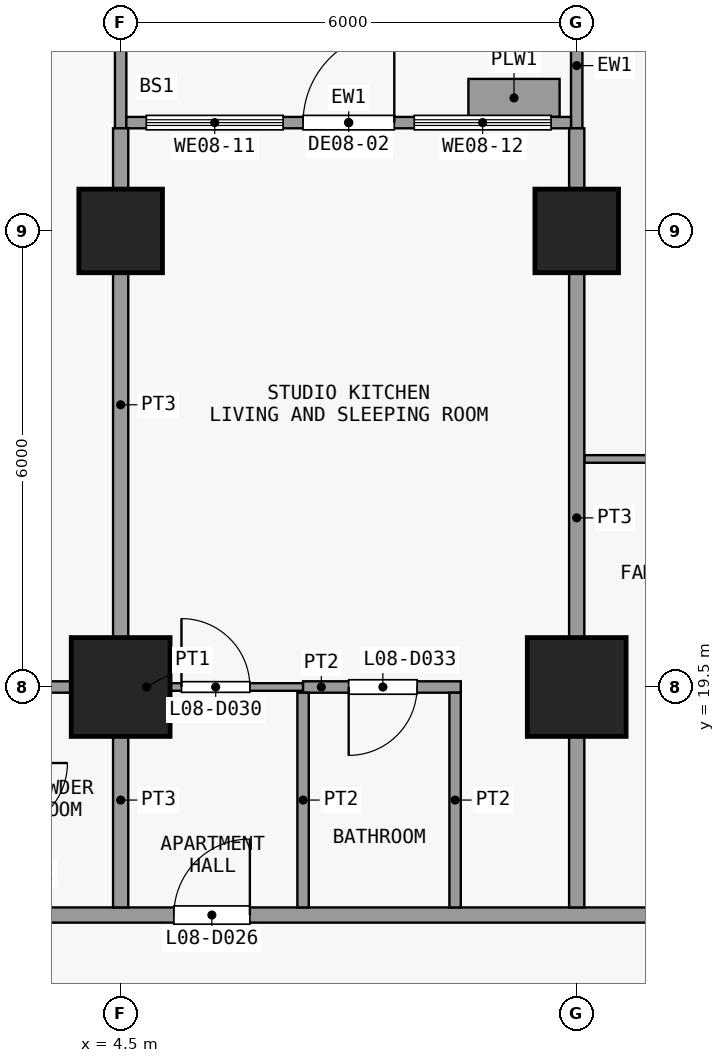
"""IFC4 building model, lengths in metres.
Left out: names, types, materials, properties, quantities, classifications, styles, units other than length and angle.
Written with IfcOpenShell. Run it as: python <this file> out.ifc"""

import sys

from ifc_helpers import new_model, si_unit, direction, frame, frame_2d, origin, origin_2d, place, context, subcontext, project, spatial, rectangle, extrude, element, fill, save


model = new_model("IFC4")
c1 = context("Model", 3, precision=1e-05, world=origin(), true_north=direction((0.0, 1.0)))
c2 = subcontext(c1, "Body", "Model", "MODEL_VIEW")
j1 = project(units=[si_unit("LENGTHUNIT", "METRE"), si_unit("PLANEANGLEUNIT", "RADIAN")], contexts=[c1])
p1 = place(None, origin())
s1 = spatial("IfcSite", under=j1, at=p1, CompositionType="ELEMENT")
p2 = place(p1, origin())
s2 = spatial("IfcBuilding", under=s1, at=p2, CompositionType="ELEMENT")
p3 = place(p2, frame((0.0, 0.0, 39.7)))
s3 = spatial("IfcBuildingStorey", under=s2, at=p3, CompositionType="ELEMENT", Elevation=39.7)
p4 = place(p3, frame((4.5, 19.5, 0.0), z_axis=(0.0, 0.0, 1.0), x_axis=(1.0, 0.0, 0.0)))
e1 = element("IfcColumn", 1, at=p4, inside=s3, PredefinedType="COLUMN", context=c2, shape_type="SweptSolid", body=[
    extrude(rectangle(XDim=1.3, YDim=1.3, at=origin_2d()), origin(), (0.0, 0.0, 1.0), 3.6),
])
p5 = place(p3, frame((4.5, 25.5, 0.0), z_axis=(0.0, 0.0, 1.0), x_axis=(1.0, 0.0, 0.0)))
e2 = element("IfcColumn", 2, at=p5, inside=s3, PredefinedType="COLUMN", context=c2, shape_type="SweptSolid", body=[
    extrude(rectangle(XDim=1.1, YDim=1.1, at=origin_2d()), origin(), (0.0, 0.0, 1.0), 3.6),
])
p6 = place(p3, frame((10.5, 19.5, 0.0), z_axis=(0.0, 0.0, 1.0), x_axis=(1.0, 0.0, 0.0)))
e3 = element("IfcColumn", 3, at=p6, inside=s3, PredefinedType="COLUMN", context=c2, shape_type="SweptSolid", body=[
    extrude(rectangle(XDim=1.3, YDim=1.3, at=origin_2d()), origin(), (0.0, 0.0, 1.0), 3.6),
])
p7 = place(p3, frame((10.5, 25.5, 0.0), z_axis=(0.0, 0.0, 1.0), x_axis=(1.0, 0.0, 0.0)))
e4 = element("IfcColumn", 4, at=p7, inside=s3, PredefinedType="COLUMN", context=c2, shape_type="SweptSolid", body=[
    extrude(rectangle(XDim=1.1, YDim=1.1, at=origin_2d()), origin(), (0.0, 0.0, 1.0), 3.6),
])
p8 = place(p3, frame((4.5, 26.85, 0.0), z_axis=(0.0, 0.0, 1.0), x_axis=(0.0, 1.0, 0.0)))
e5 = element("IfcWall", 5, at=p8, inside=s3, PredefinedType="SOLIDWALL", context=c2, shape_type="SweptSolid", body=[
    extrude(rectangle(XDim=2.55, YDim=0.15, at=frame_2d((1.275, 0.0))), origin(), (0.0, 0.0, 1.0), 3.3),
])
p9 = place(p3, frame((10.5, 26.85, 0.0), z_axis=(0.0, 0.0, 1.0), x_axis=(0.0, 1.0, 0.0)))
e6 = element("IfcWall", 6, at=p9, inside=s3, PredefinedType="SOLIDWALL", context=c2, shape_type="SweptSolid", body=[
    extrude(rectangle(XDim=1.65, YDim=0.15, at=frame_2d((0.825, 0.0))), origin(), (0.0, 0.0, 1.0), 3.3),
])
p10 = place(p3, frame((4.575, 26.925, 0.0), z_axis=(0.0, 0.0, 1.0), x_axis=(1.0, 0.0, 0.0)))
e7 = element("IfcWall", 7, at=p10, inside=s3, PredefinedType="SOLIDWALL", context=c2, shape_type="SweptSolid", body=[
    extrude(rectangle(XDim=5.85, YDim=0.15, at=frame_2d((2.925, 0.0))), origin(), (0.0, 0.0, 1.0), 3.3),
])
p11 = place(p10, frame((2.325, 0.0, 0.0)))
e8 = element("IfcOpeningElement", 8, at=p11, cuts=e7, PredefinedType="OPENING", context=c2, shape_type="SweptSolid", body=[
    extrude(rectangle(XDim=1.2, YDim=2.4, at=frame_2d((0.6, 1.2))), frame((0.0, 0.085, 0.0), z_axis=(0.0, -1.0, 0.0), x_axis=(1.0, 0.0, 0.0)), (0.0, 0.0, 1.0), 0.17),
])
p12 = place(p10, frame((0.262, 0.0, 0.9)))
e9 = element("IfcOpeningElement", 9, at=p12, cuts=e7, PredefinedType="OPENING", context=c2, shape_type="SweptSolid", body=[
    extrude(rectangle(XDim=1.8, YDim=2.1, at=frame_2d((0.9, 1.05))), frame((0.0, 0.085, 0.0), z_axis=(0.0, -1.0, 0.0), x_axis=(1.0, 0.0, 0.0)), (0.0, 0.0, 1.0), 0.17),
])
p13 = place(p10, frame((3.788, 0.0, 0.9)))
e10 = element("IfcOpeningElement", 10, at=p13, cuts=e7, PredefinedType="OPENING", context=c2, shape_type="SweptSolid", body=[
    extrude(rectangle(XDim=1.8, YDim=2.1, at=frame_2d((0.9, 1.05))), frame((0.0, 0.085, 0.0), z_axis=(0.0, -1.0, 0.0), x_axis=(1.0, 0.0, 0.0)), (0.0, 0.0, 1.0), 0.17),
])
p14 = place(p3, frame((9.075, 27.25, 0.0), z_axis=(0.0, 0.0, 1.0), x_axis=(1.0, 0.0, 0.0)))
e11 = element("IfcWall", 11, at=p14, inside=s3, PredefinedType="USERDEFINED", context=c2, shape_type="SweptSolid", body=[
    extrude(rectangle(XDim=1.2, YDim=0.5, at=frame_2d((0.6, 0.0))), origin(), (0.0, 0.0, 1.0), 0.9),
])
p15 = place(p3, frame((-25.35, 16.5, 0.0), z_axis=(0.0, 0.0, 1.0), x_axis=(1.0, 0.0, 0.0)))
e12 = element("IfcWall", 12, at=p15, inside=s3, PredefinedType="PARTITIONING", context=c2, shape_type="SweptSolid", body=[
    extrude(rectangle(XDim=50.7, YDim=0.2, at=frame_2d((25.35, 0.0))), origin(), (0.0, 0.0, 1.0), 3.3),
])
p16 = place(p15, frame((4.55, 0.0, 0.0)))
e13 = element("IfcOpeningElement", 13, at=p16, cuts=e12, PredefinedType="OPENING", context=c2, shape_type="SweptSolid", body=[
    extrude(rectangle(XDim=1.0, YDim=2.1, at=frame_2d((0.5, 1.05))), frame((0.0, 0.11, 0.0), z_axis=(0.0, -1.0, 0.0), x_axis=(1.0, 0.0, 0.0)), (0.0, 0.0, 1.0), 0.22),
])
p17 = place(p15, frame((11.35, 0.0, 0.0)))
e14 = element("IfcOpeningElement", 14, at=p17, cuts=e12, PredefinedType="OPENING", context=c2, shape_type="SweptSolid", body=[
    extrude(rectangle(XDim=0.9, YDim=2.1, at=frame_2d((0.45, 1.05))), frame((0.0, 0.11, 0.0), z_axis=(0.0, -1.0, 0.0), x_axis=(1.0, 0.0, 0.0)), (0.0, 0.0, 1.0), 0.22),
])
p18 = place(p15, frame((17.35, 0.0, 0.0)))
e15 = element("IfcOpeningElement", 15, at=p18, cuts=e12, PredefinedType="OPENING", context=c2, shape_type="SweptSolid", body=[
    extrude(rectangle(XDim=0.9, YDim=2.1, at=frame_2d((0.45, 1.05))), frame((0.0, 0.11, 0.0), z_axis=(0.0, -1.0, 0.0), x_axis=(1.0, 0.0, 0.0)), (0.0, 0.0, 1.0), 0.22),
])
p19 = place(p15, frame((24.05, 0.0, 0.0)))
e16 = element("IfcOpeningElement", 16, at=p19, cuts=e12, PredefinedType="OPENING", context=c2, shape_type="SweptSolid", body=[
    extrude(rectangle(XDim=1.0, YDim=2.1, at=frame_2d((0.5, 1.05))), frame((0.0, 0.11, 0.0), z_axis=(0.0, -1.0, 0.0), x_axis=(1.0, 0.0, 0.0)), (0.0, 0.0, 1.0), 0.22),
])
p20 = place(p15, frame((30.55, 0.0, 0.0)))
e17 = element("IfcOpeningElement", 17, at=p20, cuts=e12, PredefinedType="OPENING", context=c2, shape_type="SweptSolid", body=[
    extrude(rectangle(XDim=1.0, YDim=2.1, at=frame_2d((0.5, 1.05))), frame((0.0, 0.11, 0.0), z_axis=(0.0, -1.0, 0.0), x_axis=(1.0, 0.0, 0.0)), (0.0, 0.0, 1.0), 0.22),
])
p21 = place(p15, frame((42.55, 0.0, 0.0)))
e18 = element("IfcOpeningElement", 18, at=p21, cuts=e12, PredefinedType="OPENING", context=c2, shape_type="SweptSolid", body=[
    extrude(rectangle(XDim=1.0, YDim=2.1, at=frame_2d((0.5, 1.05))), frame((0.0, 0.11, 0.0), z_axis=(0.0, -1.0, 0.0), x_axis=(1.0, 0.0, 0.0)), (0.0, 0.0, 1.0), 0.22),
])
p22 = place(p3, frame((4.5, 19.5, 0.0), z_axis=(0.0, 0.0, 1.0), x_axis=(1.0, 0.0, 0.0)))
e19 = element("IfcWall", 19, at=p22, inside=s3, PredefinedType="PARTITIONING", context=c2, shape_type="SweptSolid", body=[
    extrude(rectangle(XDim=2.4, YDim=0.1, at=frame_2d((1.2, 0.0))), origin(), (0.0, 0.0, 1.0), 3.3),
])
p23 = place(p22, frame((0.8, 0.0, 0.0)))
e20 = element("IfcOpeningElement", 20, at=p23, cuts=e19, PredefinedType="OPENING", context=c2, shape_type="SweptSolid", body=[
    extrude(rectangle(XDim=0.9, YDim=2.1, at=frame_2d((0.45, 1.05))), frame((0.0, 0.06, 0.0), z_axis=(0.0, -1.0, 0.0), x_axis=(1.0, 0.0, 0.0)), (0.0, 0.0, 1.0), 0.12),
])
p24 = place(p3, frame((0.4, 19.5, 0.0), z_axis=(0.0, 0.0, 1.0), x_axis=(1.0, 0.0, 0.0)))
e21 = element("IfcWall", 21, at=p24, inside=s3, PredefinedType="PARTITIONING", context=c2, shape_type="SweptSolid", body=[
    extrude(rectangle(XDim=4.1, YDim=0.15, at=frame_2d((2.05, 0.0))), origin(), (0.0, 0.0, 1.0), 3.3),
])
p25 = place(p3, frame((6.9, 19.5, 0.0), z_axis=(0.0, 0.0, 1.0), x_axis=(1.0, 0.0, 0.0)))
e22 = element("IfcWall", 22, at=p25, inside=s3, PredefinedType="PARTITIONING", context=c2, shape_type="SweptSolid", body=[
    extrude(rectangle(XDim=2.075, YDim=0.15, at=frame_2d((1.038, 0.0))), origin(), (0.0, 0.0, 1.0), 3.3),
])
p26 = place(p25, frame((0.6, 0.0, 0.0)))
e23 = element("IfcOpeningElement", 23, at=p26, cuts=e22, PredefinedType="OPENING", context=c2, shape_type="SweptSolid", body=[
    extrude(rectangle(XDim=0.9, YDim=2.1, at=frame_2d((0.45, 1.05))), frame((0.0, 0.085, 0.0), z_axis=(0.0, -1.0, 0.0), x_axis=(1.0, 0.0, 0.0)), (0.0, 0.0, 1.0), 0.17),
])
p27 = place(p3, frame((10.6, 22.5, 0.0), z_axis=(0.0, 0.0, 1.0), x_axis=(1.0, 0.0, 0.0)))
e24 = element("IfcWall", 24, at=p27, inside=s3, PredefinedType="PARTITIONING", context=c2, shape_type="SweptSolid", body=[
    extrude(rectangle(XDim=5.85, YDim=0.1, at=frame_2d((2.925, 0.0))), origin(), (0.0, 0.0, 1.0), 3.3),
])
p28 = place(p27, frame((2.5, 0.0, 0.0)))
e25 = element("IfcOpeningElement", 25, at=p28, cuts=e24, PredefinedType="OPENING", context=c2, shape_type="SweptSolid", body=[
    extrude(rectangle(XDim=0.9, YDim=2.1, at=frame_2d((0.45, 1.05))), frame((0.0, 0.06, 0.0), z_axis=(0.0, -1.0, 0.0), x_axis=(1.0, 0.0, 0.0)), (0.0, 0.0, 1.0), 0.12),
])
p29 = place(p3, frame((4.5, 16.6, 0.0), z_axis=(0.0, 0.0, 1.0), x_axis=(0.0, 1.0, 0.0)))
e26 = element("IfcWall", 26, at=p29, inside=s3, PredefinedType="PARTITIONING", context=c2, shape_type="SweptSolid", body=[
    extrude(rectangle(XDim=2.825, YDim=0.2, at=frame_2d((1.413, 0.0))), origin(), (0.0, 0.0, 1.0), 3.3),
])
p30 = place(p3, frame((4.5, 19.575, 0.0), z_axis=(0.0, 0.0, 1.0), x_axis=(0.0, 1.0, 0.0)))
e27 = element("IfcWall", 27, at=p30, inside=s3, PredefinedType="PARTITIONING", context=c2, shape_type="SweptSolid", body=[
    extrude(rectangle(XDim=7.275, YDim=0.2, at=frame_2d((3.638, 0.0))), origin(), (0.0, 0.0, 1.0), 3.3),
])
for number, where, z_axis, x_axis in (
    (28, (6.9, 16.6, 0.0), (0.0, 0.0, 1.0), (0.0, 1.0, 0.0)),
    (29, (8.9, 16.6, 0.0), (0.0, 0.0, 1.0), (0.0, 1.0, 0.0)),
):
    element("IfcWall", number, at=place(p3, frame(where, z_axis=z_axis, x_axis=x_axis)), inside=s3, PredefinedType="PARTITIONING", context=c2, shape_type="SweptSolid", body=[
        extrude(rectangle(XDim=2.825, YDim=0.15, at=frame_2d((1.413, 0.0))), origin(), (0.0, 0.0, 1.0), 3.3),
    ])
p31 = place(p3, frame((10.5, 16.6, 0.0), z_axis=(0.0, 0.0, 1.0), x_axis=(0.0, 1.0, 0.0)))
e30 = element("IfcWall", 30, at=p31, inside=s3, PredefinedType="PARTITIONING", context=c2, shape_type="SweptSolid", body=[
    extrude(rectangle(XDim=10.25, YDim=0.2, at=frame_2d((5.125, 0.0))), origin(), (0.0, 0.0, 1.0), 3.3),
])
p32 = place(p11, origin())
e31 = element("IfcDoor", 31, at=p32, inside=s3, OperationType="SINGLE_SWING_RIGHT", PredefinedType="DOOR", context=c2, shape_type="SweptSolid", body=[
    extrude(rectangle(XDim=1.2, YDim=2.4, at=frame_2d((0.6, 1.2))), frame((0.0, 0.025, 0.0), z_axis=(0.0, -1.0, 0.0), x_axis=(1.0, 0.0, 0.0)), (0.0, 0.0, 1.0), 0.05),
])
fill(e8, e31)
p33 = place(p12, origin())
e32 = element("IfcWindow", 32, at=p33, inside=s3, PartitioningType="SINGLE_PANEL", PredefinedType="WINDOW", context=c2, shape_type="SweptSolid", body=[
    extrude(rectangle(XDim=1.8, YDim=2.1, at=frame_2d((0.9, 1.05))), frame((0.0, 0.03, 0.0), z_axis=(0.0, -1.0, 0.0), x_axis=(1.0, 0.0, 0.0)), (0.0, 0.0, 1.0), 0.06),
])
fill(e9, e32)
p34 = place(p13, origin())
e33 = element("IfcWindow", 33, at=p34, inside=s3, PartitioningType="SINGLE_PANEL", PredefinedType="WINDOW", context=c2, shape_type="SweptSolid", body=[
    extrude(rectangle(XDim=1.8, YDim=2.1, at=frame_2d((0.9, 1.05))), frame((0.0, 0.03, 0.0), z_axis=(0.0, -1.0, 0.0), x_axis=(1.0, 0.0, 0.0)), (0.0, 0.0, 1.0), 0.06),
])
fill(e10, e33)
p35 = place(p20, origin())
e34 = element("IfcDoor", 34, at=p35, inside=s3, OperationType="SINGLE_SWING_LEFT", PredefinedType="DOOR", context=c2, shape_type="SweptSolid", body=[
    extrude(rectangle(XDim=1.0, YDim=2.1, at=frame_2d((0.5, 1.05))), frame((0.0, 0.025, 0.0), z_axis=(0.0, -1.0, 0.0), x_axis=(1.0, 0.0, 0.0)), (0.0, 0.0, 1.0), 0.05),
])
fill(e17, e34)
p36 = place(p23, origin())
e35 = element("IfcDoor", 35, at=p36, inside=s3, OperationType="SINGLE_SWING_RIGHT", PredefinedType="DOOR", context=c2, shape_type="SweptSolid", body=[
    extrude(rectangle(XDim=0.9, YDim=2.1, at=frame_2d((0.45, 1.05))), frame((0.0, 0.025, 0.0), z_axis=(0.0, -1.0, 0.0), x_axis=(1.0, 0.0, 0.0)), (0.0, 0.0, 1.0), 0.05),
])
fill(e20, e35)
p37 = place(p26, origin())
e36 = element("IfcDoor", 36, at=p37, inside=s3, OperationType="SINGLE_SWING_LEFT", PredefinedType="DOOR", context=c2, shape_type="SweptSolid", body=[
    extrude(rectangle(XDim=0.9, YDim=2.1, at=frame_2d((0.45, 1.05))), frame((0.0, 0.025, 0.0), z_axis=(0.0, -1.0, 0.0), x_axis=(1.0, 0.0, 0.0)), (0.0, 0.0, 1.0), 0.05),
])
fill(e23, e36)
save(model, sys.argv[1])
